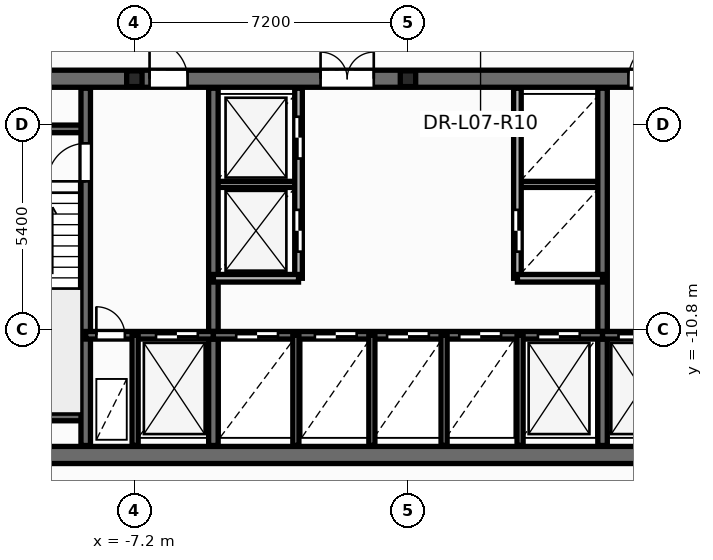
"""IFC4 building model, lengths in metres.
Left out: names, types, materials, properties, quantities, classifications, styles, units other than length and angle.
Written with IfcOpenShell. Run it as: python <this file> out.ifc"""

import sys

from ifc_helpers import new_model, si_unit, direction, frame, frame_2d, origin, origin_2d, place, context, subcontext, project, spatial, rectangle, i_section, extrude, element, fill, save


model = new_model("IFC4")
c1 = context("Model", 3, precision=1e-05, world=origin(), true_north=direction((0.0, 1.0)))
c2 = subcontext(c1, "Body", "Model", "MODEL_VIEW")
j1 = project(units=[si_unit("LENGTHUNIT", "METRE"), si_unit("PLANEANGLEUNIT", "RADIAN")], contexts=[c1])
p1 = place(None, origin())
s1 = spatial("IfcSite", under=j1, at=p1, CompositionType="ELEMENT")
p2 = place(p1, origin())
s2 = spatial("IfcBuilding", under=s1, at=p2, CompositionType="ELEMENT")
p3 = place(p2, frame((0.0, 0.0, 31.5)))
s3 = spatial("IfcBuildingStorey", under=s2, at=p3, CompositionType="ELEMENT", Elevation=31.5)
for number, where, z_axis, x_axis in (
    (1, (-7.2, -4.2, 0.0), (0.0, 0.0, 1.0), (1.0, 0.0, 0.0)),
    (2, (0.0, -4.2, 0.0), (0.0, 0.0, 1.0), (1.0, 0.0, 0.0)),
):
    element("IfcColumn", number, at=place(p3, frame(where, z_axis=z_axis, x_axis=x_axis)), inside=s3, PredefinedType="PILASTER", context=c2, shape_type="SweptSolid", body=[
        extrude(i_section(OverallWidth=0.405, OverallDepth=0.414, WebThickness=0.022, FlangeThickness=0.032, at=origin_2d()), origin(), (0.0, 0.0, 1.0), 3.6),
    ])
for number, where, z_axis, x_axis in (
    (3, (-5.12, -6.98, 0.0), (0.0, 0.0, 1.0), (1.0, 0.0, 0.0)),
    (4, (2.88, -6.98, 0.0), (0.0, 0.0, 1.0), (1.0, 0.0, 0.0)),
):
    element("IfcWall", number, at=place(p3, frame(where, z_axis=z_axis, x_axis=x_axis)), inside=s3, PredefinedType="PARTITIONING", context=c2, shape_type="SweptSolid", body=[
        extrude(rectangle(XDim=2.24, YDim=0.16, at=frame_2d((1.12, 0.0))), origin(), (0.0, 0.0, 1.0), 3.35),
    ])
p4 = place(p3, frame((-12.65, -14.1, 0.0), z_axis=(0.0, 0.0, 1.0), x_axis=(1.0, 0.0, 0.0)))
e5 = element("IfcWall", 5, at=p4, inside=s3, PredefinedType="SHEAR", context=c2, shape_type="SweptSolid", body=[
    extrude(rectangle(XDim=25.3, YDim=0.45, at=frame_2d((12.65, 0.0))), origin(), (0.0, 0.0, 1.0), 3.6),
])
p5 = place(p3, frame((-12.65, -4.2, 0.0), z_axis=(0.0, 0.0, 1.0), x_axis=(1.0, 0.0, 0.0)))
e6 = element("IfcWall", 6, at=p5, inside=s3, PredefinedType="SHEAR", context=c2, shape_type="SweptSolid", body=[
    extrude(rectangle(XDim=25.3, YDim=0.45, at=frame_2d((12.65, 0.0))), origin(), (0.0, 0.0, 1.0), 3.6),
])
p6 = place(p5, frame((1.85, 0.0, 0.0)))
e7 = element("IfcOpeningElement", 7, at=p6, cuts=e6, PredefinedType="OPENING", context=c2, shape_type="SweptSolid", body=[
    extrude(rectangle(XDim=0.756, YDim=2.054, at=frame_2d((0.375, 1.027))), frame((0.0, 0.235, 0.0), z_axis=(0.0, -1.0, 0.0), x_axis=(1.0, 0.0, 0.0)), (0.0, 0.0, 1.0), 0.47),
])
p7 = place(p5, frame((21.85, 0.0, 0.0)))
e8 = element("IfcOpeningElement", 8, at=p7, cuts=e6, PredefinedType="OPENING", context=c2, shape_type="SweptSolid", body=[
    extrude(rectangle(XDim=0.756, YDim=2.054, at=frame_2d((0.375, 1.027))), frame((0.0, 0.235, 0.0), z_axis=(0.0, -1.0, 0.0), x_axis=(1.0, 0.0, 0.0)), (0.0, 0.0, 1.0), 0.47),
])
p8 = place(p5, frame((23.5, 0.0, 0.0)))
e9 = element("IfcOpeningElement", 9, at=p8, cuts=e6, PredefinedType="OPENING", context=c2, shape_type="SweptSolid", body=[
    extrude(rectangle(XDim=0.756, YDim=2.054, at=frame_2d((0.375, 1.027))), frame((0.0, 0.235, 0.0), z_axis=(0.0, -1.0, 0.0), x_axis=(1.0, 0.0, 0.0)), (0.0, 0.0, 1.0), 0.47),
])
p9 = place(p5, frame((5.85, 0.0, 0.0)))
e10 = element("IfcOpeningElement", 10, at=p9, cuts=e6, PredefinedType="OPENING", context=c2, shape_type="SweptSolid", body=[
    extrude(rectangle(XDim=1.006, YDim=2.104, at=frame_2d((0.5, 1.052))), frame((0.0, 0.235, 0.0), z_axis=(0.0, -1.0, 0.0), x_axis=(1.0, 0.0, 0.0)), (0.0, 0.0, 1.0), 0.47),
])
p10 = place(p5, frame((10.35, 0.0, 0.0)))
e11 = element("IfcOpeningElement", 11, at=p10, cuts=e6, PredefinedType="OPENING", context=c2, shape_type="SweptSolid", body=[
    extrude(rectangle(XDim=1.406, YDim=2.154, at=frame_2d((0.7, 1.077))), frame((0.0, 0.235, 0.0), z_axis=(0.0, -1.0, 0.0), x_axis=(1.0, 0.0, 0.0)), (0.0, 0.0, 1.0), 0.47),
])
p11 = place(p5, frame((18.45, 0.0, 0.0)))
e12 = element("IfcOpeningElement", 12, at=p11, cuts=e6, PredefinedType="OPENING", context=c2, shape_type="SweptSolid", body=[
    extrude(rectangle(XDim=1.006, YDim=2.104, at=frame_2d((0.5, 1.052))), frame((0.0, 0.235, 0.0), z_axis=(0.0, -1.0, 0.0), x_axis=(1.0, 0.0, 0.0)), (0.0, 0.0, 1.0), 0.47),
])
for number, where, z_axis, x_axis in (
    (13, (-12.35, -5.52, 0.0), (0.0, 0.0, 1.0), (1.0, 0.0, 0.0)),
    (14, (-12.35, -13.1, 0.0), (0.0, 0.0, 1.0), (1.0, 0.0, 0.0)),
):
    element("IfcWall", number, at=place(p3, frame(where, z_axis=z_axis, x_axis=x_axis)), inside=s3, PredefinedType="SOLIDWALL", context=c2, shape_type="SweptSolid", body=[
        extrude(rectangle(XDim=3.87, YDim=0.2, at=frame_2d((1.935, 0.0))), origin(), (0.0, 0.0, 1.0), 3.6),
    ])
p12 = place(p3, frame((-8.48, -13.85, 0.0), z_axis=(0.0, 0.0, 1.0), x_axis=(0.0, 1.0, 0.0)))
e15 = element("IfcWall", 15, at=p12, inside=s3, PredefinedType="SHEAR", context=c2, shape_type="SweptSolid", body=[
    extrude(rectangle(XDim=9.4, YDim=0.25, at=frame_2d((4.7, 0.0))), origin(), (0.0, 0.0, 1.0), 3.6),
])
p13 = place(p12, frame((6.95, 0.0, 0.0)))
e16 = element("IfcOpeningElement", 16, at=p13, cuts=e15, PredefinedType="OPENING", context=c2, shape_type="SweptSolid", body=[
    extrude(rectangle(XDim=1.006, YDim=2.104, at=frame_2d((0.5, 1.052))), frame((0.0, 0.135, 0.0), z_axis=(0.0, -1.0, 0.0), x_axis=(1.0, 0.0, 0.0)), (0.0, 0.0, 1.0), 0.27),
])
for number, where, z_axis, x_axis in (
    (17, (-5.12, -13.85, 0.0), (0.0, 0.0, 1.0), (0.0, 1.0, 0.0)),
    (18, (5.12, -13.85, 0.0), (0.0, 0.0, 1.0), (0.0, 1.0, 0.0)),
):
    element("IfcWall", number, at=place(p3, frame(where, z_axis=z_axis, x_axis=x_axis)), inside=s3, PredefinedType="SHEAR", context=c2, shape_type="SweptSolid", body=[
        extrude(rectangle(XDim=9.4, YDim=0.25, at=frame_2d((4.7, 0.0))), origin(), (0.0, 0.0, 1.0), 3.6),
    ])
p14 = place(p3, frame((-8.48, -10.95, 0.0), z_axis=(0.0, 0.0, 1.0), x_axis=(1.0, 0.0, 0.0)))
e19 = element("IfcWall", 19, at=p14, inside=s3, PredefinedType="SOLIDWALL", context=c2, shape_type="SweptSolid", body=[
    extrude(rectangle(XDim=3.36, YDim=0.2, at=frame_2d((1.68, 0.0))), origin(), (0.0, 0.0, 1.0), 3.6),
])
p15 = place(p14, frame((0.28, 0.0, 0.0)))
e20 = element("IfcOpeningElement", 20, at=p15, cuts=e19, PredefinedType="OPENING", context=c2, shape_type="SweptSolid", body=[
    extrude(rectangle(XDim=0.756, YDim=2.054, at=frame_2d((0.375, 1.027))), frame((0.0, 0.11, 0.0), z_axis=(0.0, -1.0, 0.0), x_axis=(1.0, 0.0, 0.0)), (0.0, 0.0, 1.0), 0.22),
])
p16 = place(p14, frame((1.85, 0.0, 0.0)))
e21 = element("IfcOpeningElement", 21, at=p16, cuts=e19, PredefinedType="OPENING", context=c2, shape_type="SweptSolid", body=[
    extrude(rectangle(XDim=1.106, YDim=2.104, at=frame_2d((0.55, 1.052))), frame((0.0, 0.11, 0.0), z_axis=(0.0, -1.0, 0.0), x_axis=(1.0, 0.0, 0.0)), (0.0, 0.0, 1.0), 0.22),
])
p17 = place(p3, frame((-5.12, -10.95, 0.0), z_axis=(0.0, 0.0, 1.0), x_axis=(1.0, 0.0, 0.0)))
e22 = element("IfcWall", 22, at=p17, inside=s3, PredefinedType="SOLIDWALL", context=c2, shape_type="SweptSolid", body=[
    extrude(rectangle(XDim=10.24, YDim=0.2, at=frame_2d((5.12, 0.0))), origin(), (0.0, 0.0, 1.0), 3.6),
])
p18 = place(p17, frame((0.6, 0.0, 0.0)))
e23 = element("IfcOpeningElement", 23, at=p18, cuts=e22, PredefinedType="OPENING", context=c2, shape_type="SweptSolid", body=[
    extrude(rectangle(XDim=1.106, YDim=2.104, at=frame_2d((0.55, 1.052))), frame((0.0, 0.11, 0.0), z_axis=(0.0, -1.0, 0.0), x_axis=(1.0, 0.0, 0.0)), (0.0, 0.0, 1.0), 0.22),
])
p19 = place(p17, frame((2.67, 0.0, 0.0)))
e24 = element("IfcOpeningElement", 24, at=p19, cuts=e22, PredefinedType="OPENING", context=c2, shape_type="SweptSolid", body=[
    extrude(rectangle(XDim=1.106, YDim=2.104, at=frame_2d((0.55, 1.052))), frame((0.0, 0.11, 0.0), z_axis=(0.0, -1.0, 0.0), x_axis=(1.0, 0.0, 0.0)), (0.0, 0.0, 1.0), 0.22),
])
p20 = place(p17, frame((4.57, 0.0, 0.0)))
e25 = element("IfcOpeningElement", 25, at=p20, cuts=e22, PredefinedType="OPENING", context=c2, shape_type="SweptSolid", body=[
    extrude(rectangle(XDim=1.106, YDim=2.104, at=frame_2d((0.55, 1.052))), frame((0.0, 0.11, 0.0), z_axis=(0.0, -1.0, 0.0), x_axis=(1.0, 0.0, 0.0)), (0.0, 0.0, 1.0), 0.22),
])
p21 = place(p17, frame((6.47, 0.0, 0.0)))
e26 = element("IfcOpeningElement", 26, at=p21, cuts=e22, PredefinedType="OPENING", context=c2, shape_type="SweptSolid", body=[
    extrude(rectangle(XDim=1.106, YDim=2.104, at=frame_2d((0.55, 1.052))), frame((0.0, 0.11, 0.0), z_axis=(0.0, -1.0, 0.0), x_axis=(1.0, 0.0, 0.0)), (0.0, 0.0, 1.0), 0.22),
])
p22 = place(p17, frame((8.54, 0.0, 0.0)))
e27 = element("IfcOpeningElement", 27, at=p22, cuts=e22, PredefinedType="OPENING", context=c2, shape_type="SweptSolid", body=[
    extrude(rectangle(XDim=1.106, YDim=2.104, at=frame_2d((0.55, 1.052))), frame((0.0, 0.11, 0.0), z_axis=(0.0, -1.0, 0.0), x_axis=(1.0, 0.0, 0.0)), (0.0, 0.0, 1.0), 0.22),
])
p23 = place(p3, frame((5.12, -10.95, 0.0), z_axis=(0.0, 0.0, 1.0), x_axis=(1.0, 0.0, 0.0)))
e28 = element("IfcWall", 28, at=p23, inside=s3, PredefinedType="SOLIDWALL", context=c2, shape_type="SweptSolid", body=[
    extrude(rectangle(XDim=3.36, YDim=0.2, at=frame_2d((1.68, 0.0))), origin(), (0.0, 0.0, 1.0), 3.6),
])
p24 = place(p23, frame((0.42, 0.0, 0.0)))
e29 = element("IfcOpeningElement", 29, at=p24, cuts=e28, PredefinedType="OPENING", context=c2, shape_type="SweptSolid", body=[
    extrude(rectangle(XDim=1.106, YDim=2.104, at=frame_2d((0.55, 1.052))), frame((0.0, 0.11, 0.0), z_axis=(0.0, -1.0, 0.0), x_axis=(1.0, 0.0, 0.0)), (0.0, 0.0, 1.0), 0.22),
])
p25 = place(p23, frame((2.3, 0.0, 0.0)))
e30 = element("IfcOpeningElement", 30, at=p25, cuts=e28, PredefinedType="OPENING", context=c2, shape_type="SweptSolid", body=[
    extrude(rectangle(XDim=0.756, YDim=2.054, at=frame_2d((0.375, 1.027))), frame((0.0, 0.11, 0.0), z_axis=(0.0, -1.0, 0.0), x_axis=(1.0, 0.0, 0.0)), (0.0, 0.0, 1.0), 0.22),
])
for number, where, z_axis, x_axis in (
    (31, (-7.18, -13.85, 0.0), (0.0, 0.0, 1.0), (0.0, 1.0, 0.0)),
    (32, (-2.95, -13.85, 0.0), (0.0, 0.0, 1.0), (0.0, 1.0, 0.0)),
    (33, (2.95, -13.85, 0.0), (0.0, 0.0, 1.0), (0.0, 1.0, 0.0)),
):
    element("IfcWall", number, at=place(p3, frame(where, z_axis=z_axis, x_axis=x_axis)), inside=s3, PredefinedType="PARTITIONING", context=c2, shape_type="SweptSolid", body=[
        extrude(rectangle(XDim=2.9, YDim=0.16, at=frame_2d((1.45, 0.0))), origin(), (0.0, 0.0, 1.0), 2.375),
    ])
p26 = place(p3, frame((-2.88, -9.45, 0.0), z_axis=(0.0, 0.0, 1.0), x_axis=(0.0, 1.0, 0.0)))
e34 = element("IfcWall", 34, at=p26, inside=s3, PredefinedType="SOLIDWALL", context=c2, shape_type="SweptSolid", body=[
    extrude(rectangle(XDim=5.0, YDim=0.2, at=frame_2d((2.5, 0.0))), origin(), (0.0, 0.0, 1.0), 3.35),
])
p27 = place(p26, frame((0.7, 0.0, 0.0)))
e35 = element("IfcOpeningElement", 35, at=p27, cuts=e34, PredefinedType="OPENING", context=c2, shape_type="SweptSolid", body=[
    extrude(rectangle(XDim=1.106, YDim=2.104, at=frame_2d((0.55, 1.052))), frame((0.0, 0.11, 0.0), z_axis=(0.0, -1.0, 0.0), x_axis=(1.0, 0.0, 0.0)), (0.0, 0.0, 1.0), 0.22),
])
p28 = place(p26, frame((3.15, 0.0, 0.0)))
e36 = element("IfcOpeningElement", 36, at=p28, cuts=e34, PredefinedType="OPENING", context=c2, shape_type="SweptSolid", body=[
    extrude(rectangle(XDim=1.106, YDim=2.104, at=frame_2d((0.55, 1.052))), frame((0.0, 0.11, 0.0), z_axis=(0.0, -1.0, 0.0), x_axis=(1.0, 0.0, 0.0)), (0.0, 0.0, 1.0), 0.22),
])
p29 = place(p3, frame((-5.12, -9.45, 0.0), z_axis=(0.0, 0.0, 1.0), x_axis=(1.0, 0.0, 0.0)))
e37 = element("IfcWall", 37, at=p29, inside=s3, PredefinedType="SOLIDWALL", context=c2, shape_type="SweptSolid", body=[
    extrude(rectangle(XDim=2.24, YDim=0.2, at=frame_2d((1.12, 0.0))), origin(), (0.0, 0.0, 1.0), 3.35),
])
p30 = place(p3, frame((2.88, -9.45, 0.0), z_axis=(0.0, 0.0, 1.0), x_axis=(0.0, 1.0, 0.0)))
e38 = element("IfcWall", 38, at=p30, inside=s3, PredefinedType="SOLIDWALL", context=c2, shape_type="SweptSolid", body=[
    extrude(rectangle(XDim=5.0, YDim=0.2, at=frame_2d((2.5, 0.0))), origin(), (0.0, 0.0, 1.0), 3.35),
])
p31 = place(p30, frame((0.7, 0.0, 0.0)))
e39 = element("IfcOpeningElement", 39, at=p31, cuts=e38, PredefinedType="OPENING", context=c2, shape_type="SweptSolid", body=[
    extrude(rectangle(XDim=1.106, YDim=2.104, at=frame_2d((0.55, 1.052))), frame((0.0, 0.11, 0.0), z_axis=(0.0, -1.0, 0.0), x_axis=(1.0, 0.0, 0.0)), (0.0, 0.0, 1.0), 0.22),
])
p32 = place(p3, frame((2.88, -9.45, 0.0), z_axis=(0.0, 0.0, 1.0), x_axis=(1.0, 0.0, 0.0)))
e40 = element("IfcWall", 40, at=p32, inside=s3, PredefinedType="SOLIDWALL", context=c2, shape_type="SweptSolid", body=[
    extrude(rectangle(XDim=2.24, YDim=0.2, at=frame_2d((1.12, 0.0))), origin(), (0.0, 0.0, 1.0), 3.35),
])
for number, where, z_axis, x_axis in (
    (41, (-0.95, -13.85, 0.0), (0.0, 0.0, 1.0), (0.0, 1.0, 0.0)),
    (42, (0.95, -13.85, 0.0), (0.0, 0.0, 1.0), (0.0, 1.0, 0.0)),
):
    element("IfcWall", number, at=place(p3, frame(where, z_axis=z_axis, x_axis=x_axis)), inside=s3, PredefinedType="PARTITIONING", context=c2, shape_type="SweptSolid", body=[
        extrude(rectangle(XDim=2.9, YDim=0.16, at=frame_2d((1.45, 0.0))), origin(), (0.0, 0.0, 1.0), 2.375),
    ])
p33 = place(p27, origin())
e43 = element("IfcDoor", 43, at=p33, inside=s3, OperationType="DOUBLE_DOOR_SLIDING", PredefinedType="DOOR", context=c2, shape_type="SweptSolid", body=[
    extrude(rectangle(XDim=1.1, YDim=2.1, at=frame_2d((0.55, 1.05))), frame((0.0, 0.025, 0.0), z_axis=(0.0, -1.0, 0.0), x_axis=(1.0, 0.0, 0.0)), (0.0, 0.0, 1.0), 0.05),
])
fill(e35, e43)
p34 = place(p28, origin())
e44 = element("IfcDoor", 44, at=p34, inside=s3, OperationType="DOUBLE_DOOR_SLIDING", PredefinedType="DOOR", context=c2, shape_type="SweptSolid", body=[
    extrude(rectangle(XDim=1.1, YDim=2.1, at=frame_2d((0.55, 1.05))), frame((0.0, 0.025, 0.0), z_axis=(0.0, -1.0, 0.0), x_axis=(1.0, 0.0, 0.0)), (0.0, 0.0, 1.0), 0.05),
])
fill(e36, e44)
p35 = place(p31, origin())
e45 = element("IfcDoor", 45, at=p35, inside=s3, OperationType="DOUBLE_DOOR_SLIDING", PredefinedType="DOOR", context=c2, shape_type="SweptSolid", body=[
    extrude(rectangle(XDim=1.1, YDim=2.1, at=frame_2d((0.55, 1.05))), frame((0.0, 0.025, 0.0), z_axis=(0.0, -1.0, 0.0), x_axis=(1.0, 0.0, 0.0)), (0.0, 0.0, 1.0), 0.05),
])
fill(e39, e45)
p36 = place(p13, origin())
e46 = element("IfcDoor", 46, at=p36, inside=s3, OperationType="SINGLE_SWING_LEFT", PredefinedType="DOOR", context=c2, shape_type="SweptSolid", body=[
    extrude(rectangle(XDim=1.0, YDim=2.1, at=frame_2d((0.5, 1.05))), frame((0.0, 0.025, 0.0), z_axis=(0.0, -1.0, 0.0), x_axis=(1.0, 0.0, 0.0)), (0.0, 0.0, 1.0), 0.05),
])
fill(e16, e46)
p37 = place(p15, origin())
e47 = element("IfcDoor", 47, at=p37, inside=s3, OperationType="SINGLE_SWING_LEFT", PredefinedType="DOOR", context=c2, shape_type="SweptSolid", body=[
    extrude(rectangle(XDim=0.75, YDim=2.05, at=frame_2d((0.375, 1.025))), frame((0.0, 0.025, 0.0), z_axis=(0.0, -1.0, 0.0), x_axis=(1.0, 0.0, 0.0)), (0.0, 0.0, 1.0), 0.05),
])
fill(e20, e47)
p38 = place(p16, origin())
e48 = element("IfcDoor", 48, at=p38, inside=s3, OperationType="DOUBLE_DOOR_SLIDING", PredefinedType="DOOR", context=c2, shape_type="SweptSolid", body=[
    extrude(rectangle(XDim=1.1, YDim=2.1, at=frame_2d((0.55, 1.05))), frame((0.0, 0.025, 0.0), z_axis=(0.0, -1.0, 0.0), x_axis=(1.0, 0.0, 0.0)), (0.0, 0.0, 1.0), 0.05),
])
fill(e21, e48)
p39 = place(p24, origin())
e49 = element("IfcDoor", 49, at=p39, inside=s3, OperationType="DOUBLE_DOOR_SLIDING", PredefinedType="DOOR", context=c2, shape_type="SweptSolid", body=[
    extrude(rectangle(XDim=1.1, YDim=2.1, at=frame_2d((0.55, 1.05))), frame((0.0, 0.025, 0.0), z_axis=(0.0, -1.0, 0.0), x_axis=(1.0, 0.0, 0.0)), (0.0, 0.0, 1.0), 0.05),
])
fill(e29, e49)
p40 = place(p18, origin())
e50 = element("IfcDoor", 50, at=p40, inside=s3, OperationType="DOUBLE_DOOR_SLIDING", PredefinedType="DOOR", context=c2, shape_type="SweptSolid", body=[
    extrude(rectangle(XDim=1.1, YDim=2.1, at=frame_2d((0.55, 1.05))), frame((0.0, 0.025, 0.0), z_axis=(0.0, -1.0, 0.0), x_axis=(1.0, 0.0, 0.0)), (0.0, 0.0, 1.0), 0.05),
])
fill(e23, e50)
p41 = place(p19, origin())
e51 = element("IfcDoor", 51, at=p41, inside=s3, OperationType="DOUBLE_DOOR_SLIDING", PredefinedType="DOOR", context=c2, shape_type="SweptSolid", body=[
    extrude(rectangle(XDim=1.1, YDim=2.1, at=frame_2d((0.55, 1.05))), frame((0.0, 0.025, 0.0), z_axis=(0.0, -1.0, 0.0), x_axis=(1.0, 0.0, 0.0)), (0.0, 0.0, 1.0), 0.05),
])
fill(e24, e51)
p42 = place(p20, origin())
e52 = element("IfcDoor", 52, at=p42, inside=s3, OperationType="DOUBLE_DOOR_SLIDING", PredefinedType="DOOR", context=c2, shape_type="SweptSolid", body=[
    extrude(rectangle(XDim=1.1, YDim=2.1, at=frame_2d((0.55, 1.05))), frame((0.0, 0.025, 0.0), z_axis=(0.0, -1.0, 0.0), x_axis=(1.0, 0.0, 0.0)), (0.0, 0.0, 1.0), 0.05),
])
fill(e25, e52)
p43 = place(p21, origin())
e53 = element("IfcDoor", 53, at=p43, inside=s3, OperationType="DOUBLE_DOOR_SLIDING", PredefinedType="DOOR", context=c2, shape_type="SweptSolid", body=[
    extrude(rectangle(XDim=1.1, YDim=2.1, at=frame_2d((0.55, 1.05))), frame((0.0, 0.025, 0.0), z_axis=(0.0, -1.0, 0.0), x_axis=(1.0, 0.0, 0.0)), (0.0, 0.0, 1.0), 0.05),
])
fill(e26, e53)
p44 = place(p22, origin())
e54 = element("IfcDoor", 54, at=p44, inside=s3, OperationType="DOUBLE_DOOR_SLIDING", PredefinedType="DOOR", context=c2, shape_type="SweptSolid", body=[
    extrude(rectangle(XDim=1.1, YDim=2.1, at=frame_2d((0.55, 1.05))), frame((0.0, 0.025, 0.0), z_axis=(0.0, -1.0, 0.0), x_axis=(1.0, 0.0, 0.0)), (0.0, 0.0, 1.0), 0.05),
])
fill(e27, e54)
p45 = place(p9, origin())
e55 = element("IfcDoor", 55, at=p45, inside=s3, OperationType="SINGLE_SWING_LEFT", PredefinedType="DOOR", context=c2, shape_type="SweptSolid", body=[
    extrude(rectangle(XDim=1.0, YDim=2.1, at=frame_2d((0.5, 1.05))), frame((0.0, 0.025, 0.0), z_axis=(0.0, -1.0, 0.0), x_axis=(1.0, 0.0, 0.0)), (0.0, 0.0, 1.0), 0.05),
])
fill(e10, e55)
p46 = place(p10, origin())
e56 = element("IfcDoor", 56, at=p46, inside=s3, OperationType="DOUBLE_DOOR_SINGLE_SWING", PredefinedType="DOOR", context=c2, shape_type="SweptSolid", body=[
    extrude(rectangle(XDim=1.4, YDim=2.15, at=frame_2d((0.7, 1.075))), frame((0.0, 0.025, 0.0), z_axis=(0.0, -1.0, 0.0), x_axis=(1.0, 0.0, 0.0)), (0.0, 0.0, 1.0), 0.05),
])
fill(e11, e56)
p47 = place(p11, origin())
e57 = element("IfcDoor", 57, at=p47, inside=s3, OperationType="SINGLE_SWING_RIGHT", PredefinedType="DOOR", context=c2, shape_type="SweptSolid", body=[
    extrude(rectangle(XDim=1.0, YDim=2.1, at=frame_2d((0.5, 1.05))), frame((0.0, 0.025, 0.0), z_axis=(0.0, -1.0, 0.0), x_axis=(1.0, 0.0, 0.0)), (0.0, 0.0, 1.0), 0.05),
])
fill(e12, e57)
save(model, sys.argv[1])
